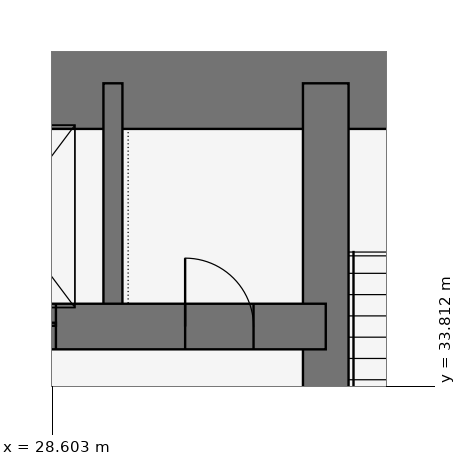
"""IFC4 building model, lengths in metres.
Left out: names, types, materials, properties, quantities, classifications, styles, units other than length and angle.
Written with IfcOpenShell. Run it as: python <this file> out.ifc"""

import sys

from ifc_helpers import new_model, si_unit, direction, frame, frame_2d, origin, place, context, subcontext, project, spatial, rectangle, extrude, element, fill, save


model = new_model("IFC4")
c1 = context("Model", 3, precision=1e-05, world=origin(), true_north=direction((0.0, 1.0)))
c2 = subcontext(c1, "Body", "Model", "MODEL_VIEW")
j1 = project(units=[si_unit("LENGTHUNIT", "METRE"), si_unit("PLANEANGLEUNIT", "RADIAN")], contexts=[c1])
p1 = place(None, origin())
s1 = spatial("IfcSite", under=j1, at=p1, CompositionType="ELEMENT")
p2 = place(p1, origin())
s2 = spatial("IfcBuilding", under=s1, at=p2, CompositionType="ELEMENT")
p3 = place(p2, frame((0.0, 0.0, 102.9)))
s3 = spatial("IfcBuildingStorey", under=s2, at=p3, CompositionType="ELEMENT", Elevation=102.9)
p4 = place(p3, frame((37.8, 37.8, 0.0), z_axis=(0.0, 0.0, 1.0), x_axis=(-1.0, 0.0, 0.0)))
e1 = element("IfcWall", 1, at=p4, inside=s3, PredefinedType="SHEAR", context=c2, shape_type="SweptSolid", body=[
    extrude(rectangle(XDim=17.4, YDim=1.2, at=frame_2d((8.7, 0.0))), origin(), (0.0, 0.0, 1.0), 6.0),
])
p5 = place(p3, frame((21.0, 34.6, 0.0), z_axis=(0.0, 0.0, 1.0), x_axis=(1.0, 0.0, 0.0)))
e2 = element("IfcWall", 2, at=p5, inside=s3, PredefinedType="SHEAR", context=c2, shape_type="SweptSolid", body=[
    extrude(rectangle(XDim=11.2, YDim=0.6, at=frame_2d((5.6, 0.0))), origin(), (0.0, 0.0, 1.0), 6.0),
])
p6 = place(p5, frame((9.35, 0.0, 0.0)))
e3 = element("IfcOpeningElement", 3, at=p6, cuts=e2, PredefinedType="OPENING", context=c2, shape_type="SweptSolid", body=[
    extrude(rectangle(XDim=0.9, YDim=2.1, at=frame_2d((0.45, 1.05))), frame((0.0, 0.31, 0.0), z_axis=(0.0, -1.0, 0.0), x_axis=(1.0, 0.0, 0.0)), (0.0, 0.0, 1.0), 0.62),
])
p7 = place(p5, frame((1.0, 0.0, 0.0)))
e4 = element("IfcOpeningElement", 4, at=p7, cuts=e2, PredefinedType="OPENING", context=c2, shape_type="SweptSolid", body=[
    extrude(rectangle(XDim=1.1, YDim=2.1, at=frame_2d((0.55, 1.05))), frame((0.0, 0.31, 0.0), z_axis=(0.0, -1.0, 0.0), x_axis=(1.0, 0.0, 0.0)), (0.0, 0.0, 1.0), 0.62),
])
p8 = place(p5, frame((3.65, 0.0, 0.0)))
e5 = element("IfcOpeningElement", 5, at=p8, cuts=e2, PredefinedType="OPENING", context=c2, shape_type="SweptSolid", body=[
    extrude(rectangle(XDim=1.1, YDim=2.1, at=frame_2d((0.55, 1.05))), frame((0.0, 0.31, 0.0), z_axis=(0.0, -1.0, 0.0), x_axis=(1.0, 0.0, 0.0)), (0.0, 0.0, 1.0), 0.62),
])
p9 = place(p5, frame((6.35, 0.0, 0.0)))
e6 = element("IfcOpeningElement", 6, at=p9, cuts=e2, PredefinedType="OPENING", context=c2, shape_type="SweptSolid", body=[
    extrude(rectangle(XDim=1.3, YDim=2.1, at=frame_2d((0.65, 1.05))), frame((0.0, 0.31, 0.0), z_axis=(0.0, -1.0, 0.0), x_axis=(1.0, 0.0, 0.0)), (0.0, 0.0, 1.0), 0.62),
])
p10 = place(p3, frame((32.2, 29.1, 0.0), z_axis=(0.0, 0.0, 1.0), x_axis=(0.0, 1.0, 0.0)))
e7 = element("IfcWall", 7, at=p10, inside=s3, PredefinedType="SHEAR", context=c2, shape_type="SweptSolid", body=[
    extrude(rectangle(XDim=8.7, YDim=0.6, at=frame_2d((4.35, 0.0))), origin(), (0.0, 0.0, 1.0), 6.0),
])
p11 = place(p3, frame((29.4, 34.6, 0.0), z_axis=(0.0, 0.0, 1.0), x_axis=(0.0, 1.0, 0.0)))
e8 = element("IfcWall", 8, at=p11, inside=s3, PredefinedType="SHEAR", context=c2, shape_type="SweptSolid", body=[
    extrude(rectangle(XDim=3.2, YDim=0.25, at=frame_2d((1.6, 0.0))), origin(), (0.0, 0.0, 1.0), 6.0),
])
p12 = place(p6, origin())
e9 = element("IfcDoor", 9, at=p12, inside=s3, OperationType="SINGLE_SWING_LEFT", PredefinedType="DOOR", context=c2, shape_type="SweptSolid", body=[
    extrude(rectangle(XDim=0.9, YDim=2.1, at=frame_2d((0.45, 1.05))), frame((0.0, 0.025, 0.0), z_axis=(0.0, -1.0, 0.0), x_axis=(1.0, 0.0, 0.0)), (0.0, 0.0, 1.0), 0.05),
])
fill(e3, e9)
p13 = place(p9, origin())
e10 = element("IfcDoor", 10, at=p13, inside=s3, OperationType="DOUBLE_DOOR_SLIDING", PredefinedType="DOOR", context=c2, shape_type="SweptSolid", body=[
    extrude(rectangle(XDim=1.3, YDim=2.1, at=frame_2d((0.65, 1.05))), frame((0.0, 0.025, 0.0), z_axis=(0.0, -1.0, 0.0), x_axis=(1.0, 0.0, 0.0)), (0.0, 0.0, 1.0), 0.05),
])
fill(e6, e10)
save(model, sys.argv[1])
